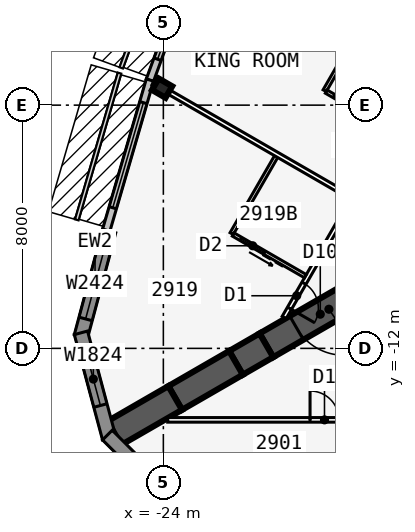
"""IFC4 building model, lengths in metres.
Left out: names, types, materials, properties, quantities, classifications, styles, units other than length and angle.
Written with IfcOpenShell. Run it as: python <this file> out.ifc"""

import sys

from ifc_helpers import new_model, si_unit, direction, frame, frame_2d, origin, origin_2d, place, context, subcontext, project, spatial, polyline, rectangle, i_section, outline, extrude, element, fill, save


model = new_model("IFC4")
c1 = context("Model", 3, precision=1e-05, world=origin(), true_north=direction((0.0, 1.0)))
c2 = subcontext(c1, "Body", "Model", "MODEL_VIEW")
j1 = project(units=[si_unit("LENGTHUNIT", "METRE"), si_unit("PLANEANGLEUNIT", "RADIAN")], contexts=[c1])
p1 = place(None, origin())
s1 = spatial("IfcSite", under=j1, at=p1, CompositionType="ELEMENT")
p2 = place(p1, origin())
s2 = spatial("IfcBuilding", under=s1, at=p2, CompositionType="ELEMENT")
p3 = place(p2, frame((0.0, 0.0, 114.7)))
s3 = spatial("IfcBuildingStorey", under=s2, at=p3, CompositionType="ELEMENT", Elevation=114.7)
p4 = place(p3, frame((-16.5, -9.526, 0.0), z_axis=(0.0, 0.0, 1.0), x_axis=(-0.866031398331, -0.499989616998, 0.0)))
e1 = element("IfcWall", 1, at=p4, inside=s3, PredefinedType="SHEAR", context=c2, shape_type="SweptSolid", body=[
    extrude(rectangle(XDim=4.746, YDim=0.9, at=frame_2d((2.373, 0.0))), origin(), (0.0, 0.0, 1.0), 3.4),
])
p5 = place(p4, frame((1.8, 0.0, 0.0)))
e2 = element("IfcOpeningElement", 2, at=p5, cuts=e1, PredefinedType="OPENING", context=c2, shape_type="SweptSolid", body=[
    extrude(rectangle(XDim=1.8, YDim=2.13, at=frame_2d((0.9, 1.065))), frame((0.0, 0.46, 0.0), z_axis=(0.0, -1.0, 0.0), x_axis=(1.0, 0.0, 0.0)), (0.0, 0.0, 1.0), 0.92),
])
p6 = place(p3, frame((-20.61, -11.899, 0.0), z_axis=(0.0, 0.0, 1.0), x_axis=(-0.866009537788, -0.500027479704, 0.0)))
e3 = element("IfcWall", 3, at=p6, inside=s3, PredefinedType="SHEAR", context=c2, shape_type="SweptSolid", body=[
    extrude(rectangle(XDim=1.155, YDim=0.9, at=frame_2d((0.577, 0.0))), origin(), (0.0, 0.0, 1.0), 3.4),
])
for number, where, z_axis, x_axis in (
    (4, (-21.61, -12.477, 0.0), (0.0, 0.0, 1.0), (-0.866, -0.5, 0.0)),
    (5, (-23.61, -13.631, 0.0), (0.0, 0.0, 1.0), (-0.866, -0.5, 0.0)),
):
    element("IfcWall", number, at=place(p3, frame(where, z_axis=z_axis, x_axis=x_axis)), inside=s3, PredefinedType="SHEAR", context=c2, shape_type="SweptSolid", body=[
        extrude(rectangle(XDim=2.309, YDim=0.9, at=frame_2d((1.155, 0.0))), origin(), (0.0, 0.0, 1.0), 3.4),
    ])
p7 = place(p3, frame((-24.041, -3.44, 0.0), z_axis=(0.0, 0.0, 1.0), x_axis=(-0.5, -0.866025403784, 0.0)))
e6 = element("IfcColumn", 6, at=p7, inside=s3, PredefinedType="COLUMN", context=c2, shape_type="SweptSolid", body=[
    extrude(i_section(OverallWidth=0.437, OverallDepth=0.513, WebThickness=0.061, FlangeThickness=0.097, at=origin_2d()), origin(), (0.0, 0.0, 1.0), 3.4),
])
p8 = place(p3, frame((-22.701, 1.584, 0.0), z_axis=(0.0, 0.0, 1.0), x_axis=(-0.343225593282, -0.939252996863, 0.0)))
e7 = element("IfcWall", 7, at=p8, inside=s3, PredefinedType="STANDARD", context=c2, shape_type="SweptSolid", body=[
    extrude(rectangle(XDim=5.076, YDim=0.25, at=frame_2d((2.538, 0.0))), origin(), (0.0, 0.0, 1.0), 3.235),
])
p9 = place(p8, frame((0.738, 0.0, 0.45)))
e8 = element("IfcOpeningElement", 8, at=p9, cuts=e7, PredefinedType="OPENING", context=c2, shape_type="SweptSolid", body=[
    extrude(rectangle(XDim=3.6, YDim=2.4, at=frame_2d((1.8, 1.2))), frame((0.0, 0.135, 0.0), z_axis=(0.0, -1.0, 0.0), x_axis=(1.0, 0.0, 0.0)), (0.0, 0.0, 1.0), 0.27),
])
p10 = place(p3, frame((-24.441, -3.175, 0.0), z_axis=(0.0, 0.0, 1.0), x_axis=(-0.279528287117, -0.960137457191, 0.0)))
e9 = element("IfcWall", 9, at=p10, inside=s3, PredefinedType="STANDARD", context=c2, shape_type="SweptSolid", body=[
    extrude(rectangle(XDim=5.148, YDim=0.25, at=frame_2d((2.574, 0.0))), origin(), (0.0, 0.0, 1.0), 3.235),
])
p11 = place(p10, frame((0.774, 0.0, 0.45)))
e10 = element("IfcOpeningElement", 10, at=p11, cuts=e9, PredefinedType="OPENING", context=c2, shape_type="SweptSolid", body=[
    extrude(rectangle(XDim=3.6, YDim=2.4, at=frame_2d((1.8, 1.2))), frame((0.0, 0.135, 0.0), z_axis=(0.0, -1.0, 0.0), x_axis=(1.0, 0.0, 0.0)), (0.0, 0.0, 1.0), 0.27),
])
p12 = place(p3, frame((-25.783, -8.141, 0.0), z_axis=(0.0, 0.0, 1.0), x_axis=(-0.258823421857, -0.965924653531, 0.0)))
e11 = element("IfcWall", 11, at=p12, inside=s3, PredefinedType="SOLIDWALL", context=c2, shape_type="SweptSolid", body=[
    extrude(rectangle(XDim=3.586, YDim=0.45, at=frame_2d((1.793, 0.0))), origin(), (0.0, 0.0, 1.0), 3.235),
])
p13 = place(p12, frame((0.593, 0.0, 0.45)))
e12 = element("IfcOpeningElement", 12, at=p13, cuts=e11, PredefinedType="OPENING", context=c2, shape_type="SweptSolid", body=[
    extrude(rectangle(XDim=2.4, YDim=2.4, at=frame_2d((1.2, 1.2))), frame((0.0, 0.235, 0.0), z_axis=(0.0, -1.0, 0.0), x_axis=(1.0, 0.0, 0.0)), (0.0, 0.0, 1.0), 0.47),
])
p14 = place(p3, frame((-26.711, -11.489, 0.0), z_axis=(0.0, 0.0, 1.0), x_axis=(0.258823421857, -0.965924653531, 0.0)))
e13 = element("IfcWall", 13, at=p14, inside=s3, PredefinedType="SOLIDWALL", context=c2, shape_type="SweptSolid", body=[
    extrude(outline(polyline([(3.586, 0.225), (3.527, 0.225), (3.035, 0.093), (3.0, 0.225), (0.0, 0.225), (0.0, -0.225), (3.586, -0.225), (3.586, 0.225)])), origin(), (0.0, 0.0, 1.0), 3.235),
])
p15 = place(p14, frame((0.675, 0.0, 0.45)))
e14 = element("IfcOpeningElement", 14, at=p15, cuts=e13, PredefinedType="OPENING", context=c2, shape_type="SweptSolid", body=[
    extrude(rectangle(XDim=1.8, YDim=2.4, at=frame_2d((0.9, 1.2))), frame((0.0, 0.235, 0.0), z_axis=(0.0, -1.0, 0.0), x_axis=(1.0, 0.0, 0.0)), (0.0, 0.0, 1.0), 0.47),
])
p16 = place(p3, frame((-25.841, -14.852, 0.0), z_axis=(0.0, 0.0, 1.0), x_axis=(0.707106781187, -0.707106781187, 0.0)))
e15 = element("IfcWall", 15, at=p16, inside=s3, PredefinedType="SOLIDWALL", context=c2, shape_type="SweptSolid", body=[
    extrude(outline(polyline([(3.586, 0.225), (0.586, 0.225), (0.551, 0.093), (0.059, 0.225), (0.0, 0.225), (0.0, -0.225), (3.586, -0.225), (3.586, 0.225)])), origin(), (0.0, 0.0, 1.0), 3.235),
])
p17 = place(p16, frame((1.111, 0.0, 0.45)))
e16 = element("IfcOpeningElement", 16, at=p17, cuts=e15, PredefinedType="OPENING", context=c2, shape_type="SweptSolid", body=[
    extrude(rectangle(XDim=1.8, YDim=2.4, at=frame_2d((0.9, 1.2))), frame((0.0, 0.235, 0.0), z_axis=(0.0, -1.0, 0.0), x_axis=(1.0, 0.0, 0.0)), (0.0, 0.0, 1.0), 0.47),
])
p18 = place(p3, frame((-23.857, -14.351, 0.0), z_axis=(0.0, 0.0, 1.0), x_axis=(1.0, 0.0, 0.0)))
e17 = element("IfcWall", 17, at=p18, inside=s3, PredefinedType="PARTITIONING", context=c2, shape_type="SweptSolid", body=[
    extrude(rectangle(XDim=47.714, YDim=0.15, at=frame_2d((23.857, 0.0))), origin(), (0.0, 0.0, 1.0), 3.235),
])
p19 = place(p18, frame((4.682, 0.0, 0.0)))
e18 = element("IfcOpeningElement", 18, at=p19, cuts=e17, PredefinedType="OPENING", context=c2, shape_type="SweptSolid", body=[
    extrude(rectangle(XDim=0.95, YDim=2.13, at=frame_2d((0.475, 1.065))), frame((0.0, 0.085, 0.0), z_axis=(0.0, -1.0, 0.0), x_axis=(1.0, 0.0, 0.0)), (0.0, 0.0, 1.0), 0.17),
])
p20 = place(p18, frame((11.482, 0.0, 0.0)))
e19 = element("IfcOpeningElement", 19, at=p20, cuts=e17, PredefinedType="OPENING", context=c2, shape_type="SweptSolid", body=[
    extrude(rectangle(XDim=0.95, YDim=2.13, at=frame_2d((0.475, 1.065))), frame((0.0, 0.085, 0.0), z_axis=(0.0, -1.0, 0.0), x_axis=(1.0, 0.0, 0.0)), (0.0, 0.0, 1.0), 0.17),
])
p21 = place(p18, frame((16.482, 0.0, 0.0)))
e20 = element("IfcOpeningElement", 20, at=p21, cuts=e17, PredefinedType="OPENING", context=c2, shape_type="SweptSolid", body=[
    extrude(rectangle(XDim=0.95, YDim=2.13, at=frame_2d((0.475, 1.065))), frame((0.0, 0.085, 0.0), z_axis=(0.0, -1.0, 0.0), x_axis=(1.0, 0.0, 0.0)), (0.0, 0.0, 1.0), 0.17),
])
p22 = place(p18, frame((21.482, 0.0, 0.0)))
e21 = element("IfcOpeningElement", 21, at=p22, cuts=e17, PredefinedType="OPENING", context=c2, shape_type="SweptSolid", body=[
    extrude(rectangle(XDim=0.95, YDim=2.13, at=frame_2d((0.475, 1.065))), frame((0.0, 0.085, 0.0), z_axis=(0.0, -1.0, 0.0), x_axis=(1.0, 0.0, 0.0)), (0.0, 0.0, 1.0), 0.17),
])
p23 = place(p18, frame((25.857, 0.0, 0.0)))
e22 = element("IfcOpeningElement", 22, at=p23, cuts=e17, PredefinedType="OPENING", context=c2, shape_type="SweptSolid", body=[
    extrude(rectangle(XDim=1.0, YDim=2.13, at=frame_2d((0.5, 1.065))), frame((0.0, 0.085, 0.0), z_axis=(0.0, -1.0, 0.0), x_axis=(1.0, 0.0, 0.0)), (0.0, 0.0, 1.0), 0.17),
])
p24 = place(p18, frame((32.082, 0.0, 0.0)))
e23 = element("IfcOpeningElement", 23, at=p24, cuts=e17, PredefinedType="OPENING", context=c2, shape_type="SweptSolid", body=[
    extrude(rectangle(XDim=0.95, YDim=2.13, at=frame_2d((0.475, 1.065))), frame((0.0, 0.085, 0.0), z_axis=(0.0, -1.0, 0.0), x_axis=(1.0, 0.0, 0.0)), (0.0, 0.0, 1.0), 0.17),
])
p25 = place(p18, frame((42.082, 0.0, 0.0)))
e24 = element("IfcOpeningElement", 24, at=p25, cuts=e17, PredefinedType="OPENING", context=c2, shape_type="SweptSolid", body=[
    extrude(rectangle(XDim=0.95, YDim=2.13, at=frame_2d((0.475, 1.065))), frame((0.0, 0.085, 0.0), z_axis=(0.0, -1.0, 0.0), x_axis=(1.0, 0.0, 0.0)), (0.0, 0.0, 1.0), 0.17),
])
p26 = place(p3, frame((-0.5, 22.836, 0.0), z_axis=(0.0, 0.0, 1.0), x_axis=(-0.500001677587, -0.866024435227, 0.0)))
e25 = element("IfcWall", 25, at=p26, inside=s3, PredefinedType="PARTITIONING", context=c2, shape_type="SweptSolid", body=[
    extrude(rectangle(XDim=39.054, YDim=0.15, at=frame_2d((19.527, 0.0))), origin(), (0.0, 0.0, 1.0), 3.235),
])
p27 = place(p26, frame((0.352, 0.0, 0.0)))
e26 = element("IfcOpeningElement", 26, at=p27, cuts=e25, PredefinedType="OPENING", context=c2, shape_type="SweptSolid", body=[
    extrude(rectangle(XDim=0.95, YDim=2.13, at=frame_2d((0.475, 1.065))), frame((0.0, 0.085, 0.0), z_axis=(0.0, -1.0, 0.0), x_axis=(1.0, 0.0, 0.0)), (0.0, 0.0, 1.0), 0.17),
])
p28 = place(p26, frame((7.152, 0.0, 0.0)))
e27 = element("IfcOpeningElement", 27, at=p28, cuts=e25, PredefinedType="OPENING", context=c2, shape_type="SweptSolid", body=[
    extrude(rectangle(XDim=0.95, YDim=2.13, at=frame_2d((0.475, 1.065))), frame((0.0, 0.085, 0.0), z_axis=(0.0, -1.0, 0.0), x_axis=(1.0, 0.0, 0.0)), (0.0, 0.0, 1.0), 0.17),
])
p29 = place(p26, frame((12.152, 0.0, 0.0)))
e28 = element("IfcOpeningElement", 28, at=p29, cuts=e25, PredefinedType="OPENING", context=c2, shape_type="SweptSolid", body=[
    extrude(rectangle(XDim=0.95, YDim=2.13, at=frame_2d((0.475, 1.065))), frame((0.0, 0.085, 0.0), z_axis=(0.0, -1.0, 0.0), x_axis=(1.0, 0.0, 0.0)), (0.0, 0.0, 1.0), 0.17),
])
p30 = place(p26, frame((17.152, 0.0, 0.0)))
e29 = element("IfcOpeningElement", 29, at=p30, cuts=e25, PredefinedType="OPENING", context=c2, shape_type="SweptSolid", body=[
    extrude(rectangle(XDim=0.95, YDim=2.13, at=frame_2d((0.475, 1.065))), frame((0.0, 0.085, 0.0), z_axis=(0.0, -1.0, 0.0), x_axis=(1.0, 0.0, 0.0)), (0.0, 0.0, 1.0), 0.17),
])
p31 = place(p26, frame((22.752, 0.0, 0.0)))
e30 = element("IfcOpeningElement", 30, at=p31, cuts=e25, PredefinedType="OPENING", context=c2, shape_type="SweptSolid", body=[
    extrude(rectangle(XDim=0.95, YDim=2.13, at=frame_2d((0.475, 1.065))), frame((0.0, 0.085, 0.0), z_axis=(0.0, -1.0, 0.0), x_axis=(1.0, 0.0, 0.0)), (0.0, 0.0, 1.0), 0.17),
])
p32 = place(p26, frame((32.152, 0.0, 0.0)))
e31 = element("IfcOpeningElement", 31, at=p32, cuts=e25, PredefinedType="OPENING", context=c2, shape_type="SweptSolid", body=[
    extrude(rectangle(XDim=0.95, YDim=2.13, at=frame_2d((0.475, 1.065))), frame((0.0, 0.085, 0.0), z_axis=(0.0, -1.0, 0.0), x_axis=(1.0, 0.0, 0.0)), (0.0, 0.0, 1.0), 0.17),
])
p33 = place(p26, frame((37.752, 0.0, 0.0)))
e32 = element("IfcOpeningElement", 32, at=p33, cuts=e25, PredefinedType="OPENING", context=c2, shape_type="SweptSolid", body=[
    extrude(rectangle(XDim=0.95, YDim=2.13, at=frame_2d((0.475, 1.065))), frame((0.0, 0.085, 0.0), z_axis=(0.0, -1.0, 0.0), x_axis=(1.0, 0.0, 0.0)), (0.0, 0.0, 1.0), 0.17),
])
p34 = place(p3, frame((-15.329, -2.697, 0.0), z_axis=(0.0, 0.0, 1.0), x_axis=(-0.866024316602, 0.50000188305, 0.0)))
e33 = element("IfcWall", 33, at=p34, inside=s3, PredefinedType="PARTITIONING", context=c2, shape_type="SweptSolid", body=[
    extrude(rectangle(XDim=8.395, YDim=0.15, at=frame_2d((4.198, 0.0))), origin(), (0.0, 0.0, 1.0), 2.389),
])
p35 = place(p3, frame((-17.829, -7.027, 0.0), z_axis=(0.0, 0.0, 1.0), x_axis=(-0.866029804378, 0.499992377871, 0.0)))
e34 = element("IfcWall", 34, at=p35, inside=s3, PredefinedType="PARTITIONING", context=c2, shape_type="SweptSolid", body=[
    extrude(rectangle(XDim=7.516, YDim=0.15, at=frame_2d((3.758, 0.0))), origin(), (0.0, 0.0, 1.0), 2.389),
])
p36 = place(p3, frame((-17.493, -1.447, 0.0), z_axis=(0.0, 0.0, 1.0), x_axis=(-0.500033551112, -0.866006032174, 0.0)))
e35 = element("IfcWall", 35, at=p36, inside=s3, PredefinedType="PLUMBINGWALL", context=c2, shape_type="SweptSolid", body=[
    extrude(rectangle(XDim=2.4, YDim=0.12, at=frame_2d((1.2, 0.0))), origin(), (0.0, 0.0, 1.0), 3.235),
])
p37 = place(p3, frame((-16.529, -4.776, 0.0), z_axis=(0.0, 0.0, 1.0), x_axis=(-0.866023955769, 0.500002508028, 0.0)))
e36 = element("IfcWall", 36, at=p37, inside=s3, PredefinedType="PLUMBINGWALL", context=c2, shape_type="SweptSolid", body=[
    extrude(rectangle(XDim=2.44, YDim=0.12, at=frame_2d((1.22, 0.0))), origin(), (0.0, 0.0, 1.0), 3.235),
])
p38 = place(p37, frame((1.25, 0.0, 0.0)))
e37 = element("IfcOpeningElement", 37, at=p38, cuts=e36, PredefinedType="OPENING", context=c2, shape_type="SweptSolid", body=[
    extrude(rectangle(XDim=0.9, YDim=2.13, at=frame_2d((0.45, 1.065))), frame((0.0, 0.07, 0.0), z_axis=(0.0, -1.0, 0.0), x_axis=(1.0, 0.0, 0.0)), (0.0, 0.0, 1.0), 0.14),
])
p39 = place(p3, frame((-20.253, -5.627, 0.0), z_axis=(0.0, 0.0, 1.0), x_axis=(-0.499990139034, -0.866031096941, 0.0)))
e38 = element("IfcWall", 38, at=p39, inside=s3, PredefinedType="PLUMBINGWALL", context=c2, shape_type="SweptSolid", body=[
    extrude(rectangle(XDim=3.0, YDim=0.12, at=frame_2d((1.5, 0.0))), origin(), (0.0, 0.0, 1.0), 3.235),
])
p40 = place(p3, frame((-19.329, -9.625, 0.0), z_axis=(0.0, 0.0, 1.0), x_axis=(-0.866035715982, 0.499982138324, 0.0)))
e39 = element("IfcWall", 39, at=p40, inside=s3, PredefinedType="PLUMBINGWALL", context=c2, shape_type="SweptSolid", body=[
    extrude(rectangle(XDim=2.74, YDim=0.12, at=frame_2d((1.37, 0.0))), origin(), (0.0, 0.0, 1.0), 3.235),
])
p41 = place(p40, frame((1.55, 0.0, 0.0)))
e40 = element("IfcOpeningElement", 40, at=p41, cuts=e39, PredefinedType="OPENING", context=c2, shape_type="SweptSolid", body=[
    extrude(rectangle(XDim=0.9, YDim=2.13, at=frame_2d((0.45, 1.065))), frame((0.0, 0.07, 0.0), z_axis=(0.0, -1.0, 0.0), x_axis=(1.0, 0.0, 0.0)), (0.0, 0.0, 1.0), 0.14),
])
p42 = place(p9, origin())
e41 = element("IfcWindow", 41, at=p42, inside=s3, PartitioningType="SINGLE_PANEL", PredefinedType="WINDOW", context=c2, shape_type="SweptSolid", body=[
    extrude(rectangle(XDim=3.6, YDim=2.4, at=frame_2d((1.8, 1.2))), frame((0.0, 0.03, 0.0), z_axis=(0.0, -1.0, 0.0), x_axis=(1.0, 0.0, 0.0)), (0.0, 0.0, 1.0), 0.06),
])
fill(e8, e41)
p43 = place(p11, origin())
e42 = element("IfcWindow", 42, at=p43, inside=s3, PartitioningType="SINGLE_PANEL", PredefinedType="WINDOW", context=c2, shape_type="SweptSolid", body=[
    extrude(rectangle(XDim=3.6, YDim=2.4, at=frame_2d((1.8, 1.2))), frame((0.0, 0.03, 0.0), z_axis=(0.0, -1.0, 0.0), x_axis=(1.0, 0.0, 0.0)), (0.0, 0.0, 1.0), 0.06),
])
fill(e10, e42)
p44 = place(p13, origin())
e43 = element("IfcWindow", 43, at=p44, inside=s3, PartitioningType="SINGLE_PANEL", PredefinedType="WINDOW", context=c2, shape_type="SweptSolid", body=[
    extrude(rectangle(XDim=2.4, YDim=2.4, at=frame_2d((1.2, 1.2))), frame((0.0, 0.03, 0.0), z_axis=(0.0, -1.0, 0.0), x_axis=(1.0, 0.0, 0.0)), (0.0, 0.0, 1.0), 0.06),
])
fill(e12, e43)
p45 = place(p15, origin())
e44 = element("IfcWindow", 44, at=p45, inside=s3, PartitioningType="SINGLE_PANEL", PredefinedType="WINDOW", context=c2, shape_type="SweptSolid", body=[
    extrude(rectangle(XDim=1.8, YDim=2.4, at=frame_2d((0.9, 1.2))), frame((0.0, 0.03, 0.0), z_axis=(0.0, -1.0, 0.0), x_axis=(1.0, 0.0, 0.0)), (0.0, 0.0, 1.0), 0.06),
])
fill(e14, e44)
p46 = place(p19, origin())
e45 = element("IfcDoor", 45, at=p46, inside=s3, OperationType="SINGLE_SWING_LEFT", PredefinedType="DOOR", context=c2, shape_type="SweptSolid", body=[
    extrude(rectangle(XDim=0.95, YDim=2.13, at=frame_2d((0.475, 1.065))), frame((0.0, 0.025, 0.0), z_axis=(0.0, -1.0, 0.0), x_axis=(1.0, 0.0, 0.0)), (0.0, 0.0, 1.0), 0.05),
])
fill(e18, e45)
p47 = place(p38, origin())
e46 = element("IfcDoor", 46, at=p47, inside=s3, OperationType="SLIDING_TO_LEFT", PredefinedType="DOOR", context=c2, shape_type="SweptSolid", body=[
    extrude(rectangle(XDim=0.9, YDim=2.13, at=frame_2d((0.45, 1.065))), frame((0.0, 0.025, 0.0), z_axis=(0.0, -1.0, 0.0), x_axis=(1.0, 0.0, 0.0)), (0.0, 0.0, 1.0), 0.05),
])
fill(e37, e46)
p48 = place(p41, origin())
e47 = element("IfcDoor", 47, at=p48, inside=s3, OperationType="SLIDING_TO_LEFT", PredefinedType="DOOR", context=c2, shape_type="SweptSolid", body=[
    extrude(rectangle(XDim=0.9, YDim=2.13, at=frame_2d((0.45, 1.065))), frame((0.0, 0.025, 0.0), z_axis=(0.0, -1.0, 0.0), x_axis=(1.0, 0.0, 0.0)), (0.0, 0.0, 1.0), 0.05),
])
fill(e40, e47)
p49 = place(p33, origin())
e48 = element("IfcDoor", 48, at=p49, inside=s3, OperationType="SINGLE_SWING_RIGHT", PredefinedType="DOOR", context=c2, shape_type="SweptSolid", body=[
    extrude(rectangle(XDim=0.95, YDim=2.13, at=frame_2d((0.475, 1.065))), frame((0.0, 0.025, 0.0), z_axis=(0.0, -1.0, 0.0), x_axis=(1.0, 0.0, 0.0)), (0.0, 0.0, 1.0), 0.05),
])
fill(e32, e48)
p50 = place(p5, origin())
e49 = element("IfcDoor", 49, at=p50, inside=s3, OperationType="DOUBLE_DOOR_DOUBLE_SWING", PredefinedType="DOOR", context=c2, shape_type="SweptSolid", body=[
    extrude(rectangle(XDim=1.8, YDim=2.13, at=frame_2d((0.9, 1.065))), frame((0.0, 0.025, 0.0), z_axis=(0.0, -1.0, 0.0), x_axis=(1.0, 0.0, 0.0)), (0.0, 0.0, 1.0), 0.05),
])
fill(e2, e49)
save(model, sys.argv[1])
